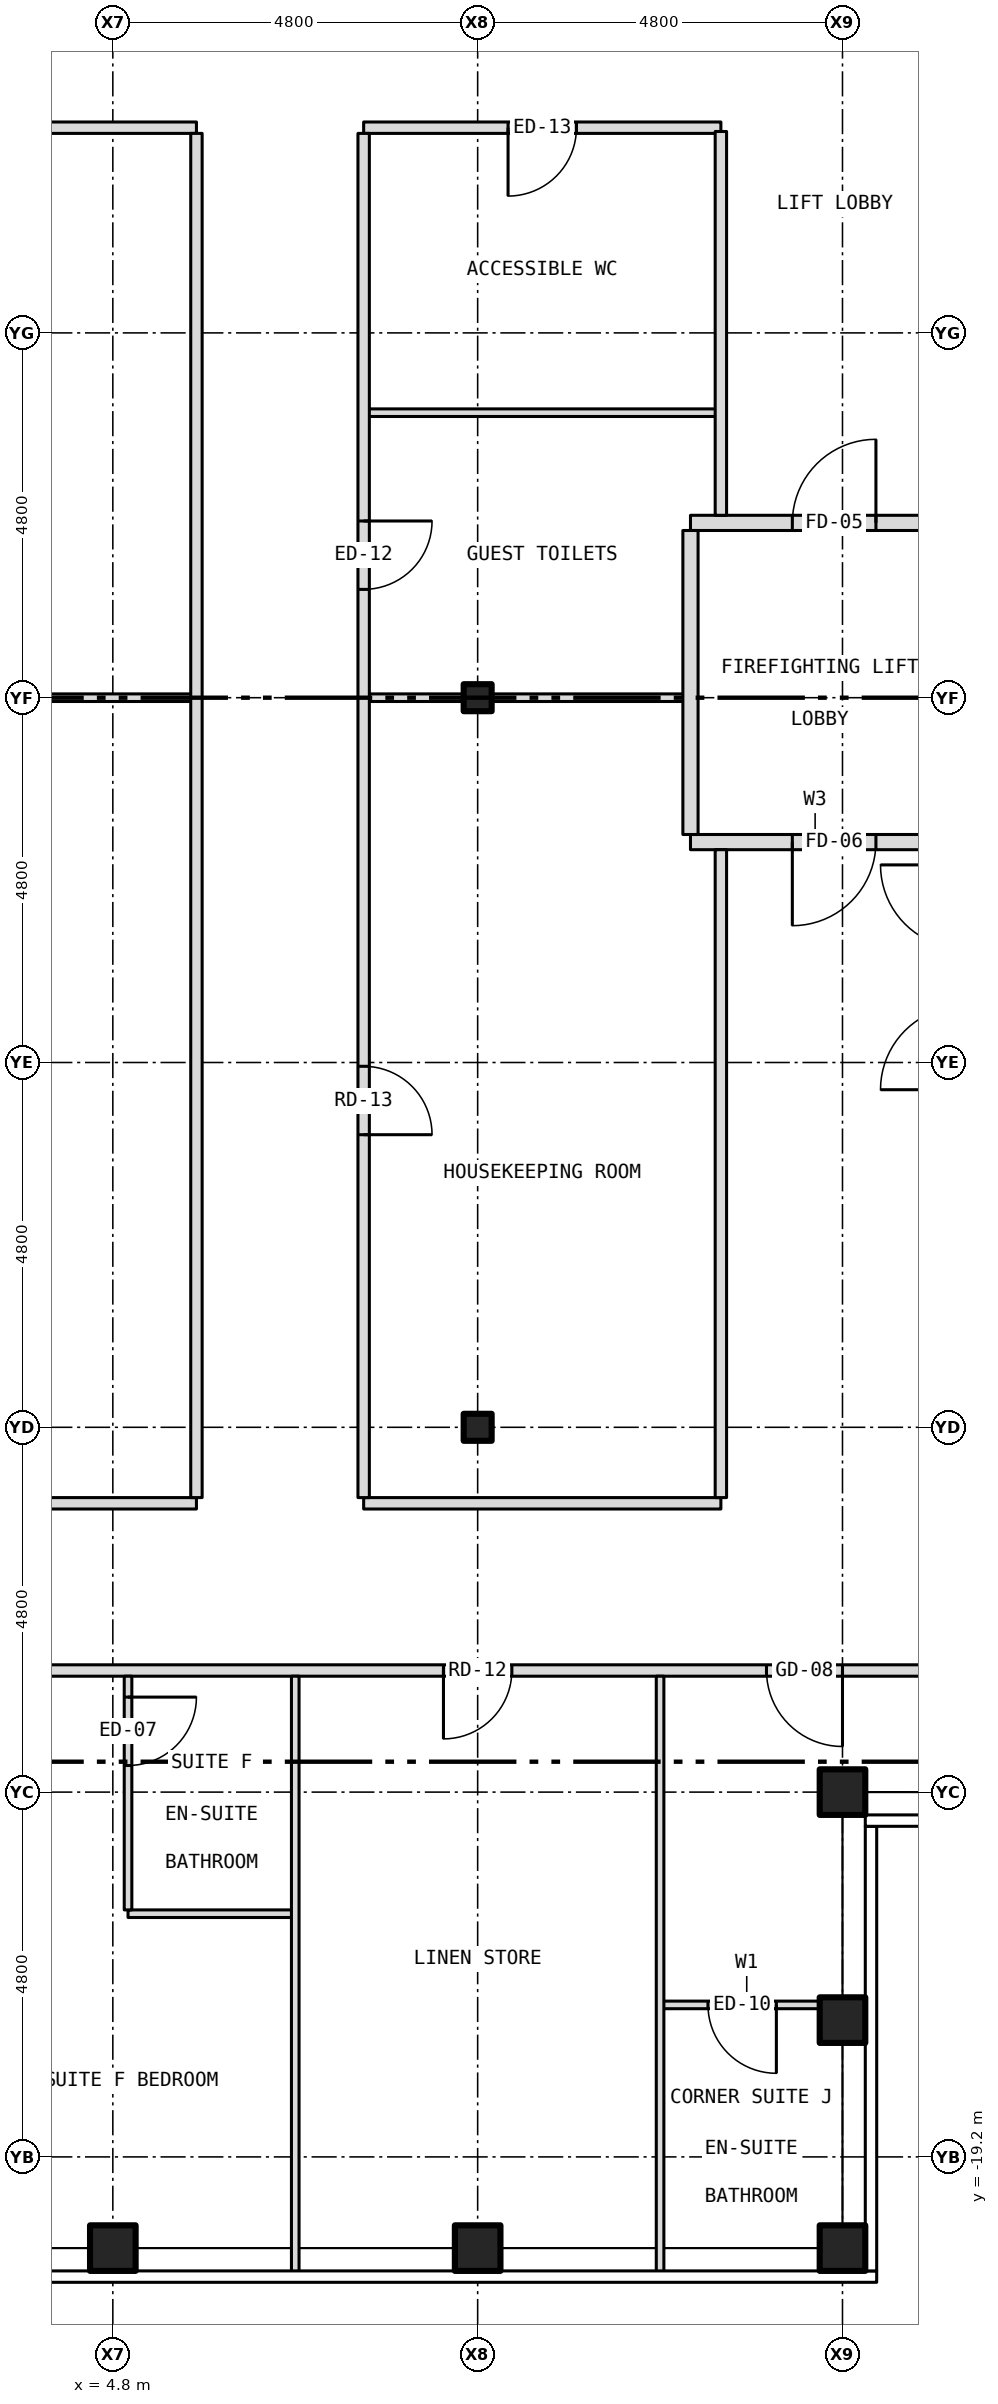
"""IFC4 building model, lengths in metres.
Left out: names, types, materials, properties, quantities, classifications, styles, units other than length and angle.
Written with IfcOpenShell. Run it as: python <this file> out.ifc"""

import sys

from ifc_helpers import new_model, si_unit, direction, frame, frame_2d, origin, origin_2d, place, context, subcontext, project, spatial, rectangle, hollow_rectangle, i_section, extrude, element, fill, save


model = new_model("IFC4")
c1 = context("Model", 3, precision=1e-05, world=origin(), true_north=direction((0.0, 1.0)))
c2 = subcontext(c1, "Body", "Model", "MODEL_VIEW")
j1 = project(units=[si_unit("LENGTHUNIT", "METRE"), si_unit("PLANEANGLEUNIT", "RADIAN")], contexts=[c1])
p1 = place(None, origin())
s1 = spatial("IfcSite", under=j1, at=p1, CompositionType="ELEMENT")
p2 = place(p1, origin())
s2 = spatial("IfcBuilding", under=s1, at=p2, CompositionType="ELEMENT")
p3 = place(p2, frame((0.0, 0.0, 262.0)))
s3 = spatial("IfcBuildingStorey", under=s2, at=p3, CompositionType="ELEMENT", Elevation=262.0)
for number, where, z_axis, x_axis in (
    (1, (4.8, -20.4, -0.15), (0.0, 0.0, 1.0), (1.0, 0.0, 0.0)),
    (2, (9.6, -20.4, -0.15), (0.0, 0.0, 1.0), (1.0, 0.0, 0.0)),
    (3, (14.4, -20.4, -0.15), (0.0, 0.0, 1.0), (1.0, 0.0, 0.0)),
    (4, (14.4, -14.4, -0.15), (0.0, 0.0, 1.0), (1.0, 0.0, 0.0)),
    (5, (14.4, -17.4, -0.15), (0.0, 0.0, 1.0), (1.0, 0.0, 0.0)),
):
    element("IfcColumn", number, at=place(p3, frame(where, z_axis=z_axis, x_axis=x_axis)), inside=s3, PredefinedType="COLUMN", context=c2, shape_type="SweptSolid", body=[
        extrude(hollow_rectangle(XDim=0.6, YDim=0.6, WallThickness=0.03, at=origin_2d()), origin(), (0.0, 0.0, 1.0), 3.4),
    ])
for number, where, z_axis, x_axis in (
    (6, (9.6, -9.6, -0.15), (0.0, 0.0, 1.0), (1.0, 0.0, 0.0)),
    (7, (9.6, 0.0, -0.15), (0.0, 0.0, 1.0), (1.0, 0.0, 0.0)),
):
    element("IfcColumn", number, at=place(p3, frame(where, z_axis=z_axis, x_axis=x_axis)), inside=s3, PredefinedType="COLUMN", context=c2, shape_type="SweptSolid", body=[
        extrude(i_section(OverallWidth=0.368, OverallDepth=0.356, WebThickness=0.011, FlangeThickness=0.018, at=origin_2d()), origin(), (0.0, 0.0, 1.0), 3.4),
    ])
p4 = place(p3, frame((12.0, -17.2, 0.0), z_axis=(0.0, 0.0, 1.0), x_axis=(1.0, 0.0, 0.0)))
e8 = element("IfcWall", 8, at=p4, inside=s3, PredefinedType="PARTITIONING", context=c2, shape_type="SweptSolid", body=[
    extrude(rectangle(XDim=2.28, YDim=0.1, at=frame_2d((1.14, 0.0))), origin(), (0.0, 0.0, 1.0), 3.25),
])
p5 = place(p4, frame((0.63, 0.0, 0.0)))
e9 = element("IfcOpeningElement", 9, at=p5, cuts=e8, PredefinedType="OPENING", context=c2, shape_type="SweptSolid", body=[
    extrude(rectangle(XDim=0.9, YDim=2.1, at=frame_2d((0.45, 1.05))), frame((0.0, 0.062, 0.0), z_axis=(0.0, -1.0, 0.0), x_axis=(1.0, 0.0, 0.0)), (0.0, 0.0, 1.0), 0.124),
])
p6 = place(p3, frame((5.0, -16.0, 0.0), z_axis=(0.0, 0.0, 1.0), x_axis=(1.0, 0.0, 0.0)))
e10 = element("IfcWall", 10, at=p6, inside=s3, PredefinedType="PARTITIONING", context=c2, shape_type="SweptSolid", body=[
    extrude(rectangle(XDim=2.2, YDim=0.1, at=frame_2d((1.1, 0.0))), origin(), (0.0, 0.0, 1.0), 3.25),
])
p7 = place(p3, frame((-15.8, -12.8, 0.0), z_axis=(0.0, 0.0, 1.0), x_axis=(1.0, 0.0, 0.0)))
e11 = element("IfcWall", 11, at=p7, inside=s3, PredefinedType="PARTITIONING", context=c2, shape_type="SweptSolid", body=[
    extrude(rectangle(XDim=31.6, YDim=0.15, at=frame_2d((15.8, 0.0))), origin(), (0.0, 0.0, 1.0), 3.25),
])
p8 = place(p7, frame((6.8, 0.0, 0.0)))
e12 = element("IfcOpeningElement", 12, at=p8, cuts=e11, PredefinedType="OPENING", context=c2, shape_type="SweptSolid", body=[
    extrude(rectangle(XDim=1.0, YDim=2.1, at=frame_2d((0.5, 1.05))), frame((0.0, 0.087, 0.0), z_axis=(0.0, -1.0, 0.0), x_axis=(1.0, 0.0, 0.0)), (0.0, 0.0, 1.0), 0.174),
])
p9 = place(p7, frame((15.35, 0.0, 0.0)))
e13 = element("IfcOpeningElement", 13, at=p9, cuts=e11, PredefinedType="OPENING", context=c2, shape_type="SweptSolid", body=[
    extrude(rectangle(XDim=0.9, YDim=2.1, at=frame_2d((0.45, 1.05))), frame((0.0, 0.087, 0.0), z_axis=(0.0, -1.0, 0.0), x_axis=(1.0, 0.0, 0.0)), (0.0, 0.0, 1.0), 0.174),
])
p10 = place(p7, frame((24.95, 0.0, 0.0)))
e14 = element("IfcOpeningElement", 14, at=p10, cuts=e11, PredefinedType="OPENING", context=c2, shape_type="SweptSolid", body=[
    extrude(rectangle(XDim=0.9, YDim=2.1, at=frame_2d((0.45, 1.05))), frame((0.0, 0.087, 0.0), z_axis=(0.0, -1.0, 0.0), x_axis=(1.0, 0.0, 0.0)), (0.0, 0.0, 1.0), 0.174),
])
p11 = place(p7, frame((1.4, 0.0, 0.0)))
e15 = element("IfcOpeningElement", 15, at=p11, cuts=e11, PredefinedType="OPENING", context=c2, shape_type="SweptSolid", body=[
    extrude(rectangle(XDim=1.0, YDim=2.1, at=frame_2d((0.5, 1.05))), frame((0.0, 0.087, 0.0), z_axis=(0.0, -1.0, 0.0), x_axis=(1.0, 0.0, 0.0)), (0.0, 0.0, 1.0), 0.174),
])
p12 = place(p7, frame((29.2, 0.0, 0.0)))
e16 = element("IfcOpeningElement", 16, at=p12, cuts=e11, PredefinedType="OPENING", context=c2, shape_type="SweptSolid", body=[
    extrude(rectangle(XDim=1.0, YDim=2.1, at=frame_2d((0.5, 1.05))), frame((0.0, 0.087, 0.0), z_axis=(0.0, -1.0, 0.0), x_axis=(1.0, 0.0, 0.0)), (0.0, 0.0, 1.0), 0.174),
])
p13 = place(p3, frame((-12.8, -10.6, 0.0), z_axis=(0.0, 0.0, 1.0), x_axis=(1.0, 0.0, 0.0)))
e17 = element("IfcWall", 17, at=p13, inside=s3, PredefinedType="PARTITIONING", context=c2, shape_type="SweptSolid", body=[
    extrude(rectangle(XDim=18.7, YDim=0.15, at=frame_2d((9.35, 0.0))), origin(), (0.0, 0.0, 1.0), 3.25),
])
p14 = place(p13, frame((8.9, 0.0, 0.0)))
e18 = element("IfcOpeningElement", 18, at=p14, cuts=e17, PredefinedType="OPENING", context=c2, shape_type="SweptSolid", body=[
    extrude(rectangle(XDim=0.9, YDim=2.1, at=frame_2d((0.45, 1.05))), frame((0.0, 0.087, 0.0), z_axis=(0.0, -1.0, 0.0), x_axis=(1.0, 0.0, 0.0)), (0.0, 0.0, 1.0), 0.174),
])
p15 = place(p3, frame((8.1, -10.6, 0.0), z_axis=(0.0, 0.0, 1.0), x_axis=(1.0, 0.0, 0.0)))
e19 = element("IfcWall", 19, at=p15, inside=s3, PredefinedType="PARTITIONING", context=c2, shape_type="SweptSolid", body=[
    extrude(rectangle(XDim=4.7, YDim=0.15, at=frame_2d((2.35, 0.0))), origin(), (0.0, 0.0, 1.0), 3.25),
])
p16 = place(p3, frame((12.4, -1.9, 0.0), z_axis=(0.0, 0.0, 1.0), x_axis=(1.0, 0.0, 0.0)))
e20 = element("IfcWall", 20, at=p16, inside=s3, PredefinedType="PARTITIONING", context=c2, shape_type="SweptSolid", body=[
    extrude(rectangle(XDim=3.28, YDim=0.2, at=frame_2d((1.64, 0.0))), origin(), (0.0, 0.0, 1.0), 3.25),
])
p17 = place(p16, frame((1.34, 0.0, 0.0)))
e21 = element("IfcOpeningElement", 21, at=p17, cuts=e20, PredefinedType="OPENING", context=c2, shape_type="SweptSolid", body=[
    extrude(rectangle(XDim=1.1, YDim=2.1, at=frame_2d((0.55, 1.05))), frame((0.0, 0.112, 0.0), z_axis=(0.0, -1.0, 0.0), x_axis=(1.0, 0.0, 0.0)), (0.0, 0.0, 1.0), 0.224),
])
p18 = place(p3, frame((0.184, 0.0, 0.0), z_axis=(0.0, 0.0, 1.0), x_axis=(1.0, 0.0, 0.0)))
e22 = element("IfcWall", 22, at=p18, inside=s3, PredefinedType="PARTITIONING", context=c2, shape_type="SweptSolid", body=[
    extrude(rectangle(XDim=5.716, YDim=0.1, at=frame_2d((2.858, 0.0))), origin(), (0.0, 0.0, 1.0), 2.16),
])
p19 = place(p3, frame((8.1, 0.0, 0.0), z_axis=(0.0, 0.0, 1.0), x_axis=(1.0, 0.0, 0.0)))
e23 = element("IfcWall", 23, at=p19, inside=s3, PredefinedType="PARTITIONING", context=c2, shape_type="SweptSolid", body=[
    extrude(rectangle(XDim=1.316, YDim=0.1, at=frame_2d((0.658, 0.0))), origin(), (0.0, 0.0, 1.0), 2.16),
])
p20 = place(p3, frame((9.416, 0.0, 0.0), z_axis=(0.0, 0.0, 1.0), x_axis=(1.0, 0.0, 0.0)))
e24 = element("IfcWall", 24, at=p20, inside=s3, PredefinedType="PARTITIONING", context=c2, shape_type="SweptSolid", body=[
    extrude(rectangle(XDim=0.368, YDim=0.1, at=frame_2d((0.184, 0.0))), origin(), (0.0, 0.0, 1.0), 3.25),
])
p21 = place(p3, frame((9.784, 0.0, 0.0), z_axis=(0.0, 0.0, 1.0), x_axis=(1.0, 0.0, 0.0)))
e25 = element("IfcWall", 25, at=p21, inside=s3, PredefinedType="PARTITIONING", context=c2, shape_type="SweptSolid", body=[
    extrude(rectangle(XDim=2.616, YDim=0.1, at=frame_2d((1.308, 0.0))), origin(), (0.0, 0.0, 1.0), 2.16),
])
p22 = place(p3, frame((12.4, 2.3, 0.0), z_axis=(0.0, 0.0, 1.0), x_axis=(1.0, 0.0, 0.0)))
e26 = element("IfcWall", 26, at=p22, inside=s3, PredefinedType="PARTITIONING", context=c2, shape_type="SweptSolid", body=[
    extrude(rectangle(XDim=3.28, YDim=0.2, at=frame_2d((1.64, 0.0))), origin(), (0.0, 0.0, 1.0), 3.25),
])
p23 = place(p22, frame((1.34, 0.0, 0.0)))
e27 = element("IfcOpeningElement", 27, at=p23, cuts=e26, PredefinedType="OPENING", context=c2, shape_type="SweptSolid", body=[
    extrude(rectangle(XDim=1.1, YDim=2.1, at=frame_2d((0.55, 1.05))), frame((0.0, 0.112, 0.0), z_axis=(0.0, -1.0, 0.0), x_axis=(1.0, 0.0, 0.0)), (0.0, 0.0, 1.0), 0.224),
])
p24 = place(p3, frame((8.1, 3.75, 0.0), z_axis=(0.0, 0.0, 1.0), x_axis=(1.0, 0.0, 0.0)))
e28 = element("IfcWall", 28, at=p24, inside=s3, PredefinedType="PARTITIONING", context=c2, shape_type="SweptSolid", body=[
    extrude(rectangle(XDim=4.7, YDim=0.1, at=frame_2d((2.35, 0.0))), origin(), (0.0, 0.0, 1.0), 3.25),
])
p25 = place(p3, frame((-12.8, 7.5, 0.0), z_axis=(0.0, 0.0, 1.0), x_axis=(1.0, 0.0, 0.0)))
e29 = element("IfcWall", 29, at=p25, inside=s3, PredefinedType="PARTITIONING", context=c2, shape_type="SweptSolid", body=[
    extrude(rectangle(XDim=18.7, YDim=0.15, at=frame_2d((9.35, 0.0))), origin(), (0.0, 0.0, 1.0), 3.25),
])
p26 = place(p25, frame((8.9, 0.0, 0.0)))
e30 = element("IfcOpeningElement", 30, at=p26, cuts=e29, PredefinedType="OPENING", context=c2, shape_type="SweptSolid", body=[
    extrude(rectangle(XDim=0.9, YDim=2.1, at=frame_2d((0.45, 1.05))), frame((0.0, 0.087, 0.0), z_axis=(0.0, -1.0, 0.0), x_axis=(1.0, 0.0, 0.0)), (0.0, 0.0, 1.0), 0.174),
])
p27 = place(p3, frame((8.1, 7.5, 0.0), z_axis=(0.0, 0.0, 1.0), x_axis=(1.0, 0.0, 0.0)))
e31 = element("IfcWall", 31, at=p27, inside=s3, PredefinedType="PARTITIONING", context=c2, shape_type="SweptSolid", body=[
    extrude(rectangle(XDim=4.7, YDim=0.15, at=frame_2d((2.35, 0.0))), origin(), (0.0, 0.0, 1.0), 3.25),
])
p28 = place(p27, frame((1.9, 0.0, 0.0)))
e32 = element("IfcOpeningElement", 32, at=p28, cuts=e31, PredefinedType="OPENING", context=c2, shape_type="SweptSolid", body=[
    extrude(rectangle(XDim=0.9, YDim=2.1, at=frame_2d((0.45, 1.05))), frame((0.0, 0.087, 0.0), z_axis=(0.0, -1.0, 0.0), x_axis=(1.0, 0.0, 0.0)), (0.0, 0.0, 1.0), 0.174),
])
p29 = place(p3, frame((5.0, -15.95, 0.0), z_axis=(0.0, 0.0, 1.0), x_axis=(0.0, 1.0, 0.0)))
e33 = element("IfcWall", 33, at=p29, inside=s3, PredefinedType="PARTITIONING", context=c2, shape_type="SweptSolid", body=[
    extrude(rectangle(XDim=3.075, YDim=0.1, at=frame_2d((1.538, 0.0))), origin(), (0.0, 0.0, 1.0), 3.25),
])
p30 = place(p29, frame((1.9, 0.0, 0.0)))
e34 = element("IfcOpeningElement", 34, at=p30, cuts=e33, PredefinedType="OPENING", context=c2, shape_type="SweptSolid", body=[
    extrude(rectangle(XDim=0.9, YDim=2.1, at=frame_2d((0.45, 1.05))), frame((0.0, 0.062, 0.0), z_axis=(0.0, -1.0, 0.0), x_axis=(1.0, 0.0, 0.0)), (0.0, 0.0, 1.0), 0.124),
])
p31 = place(p3, frame((5.9, -10.525, 0.0), z_axis=(0.0, 0.0, 1.0), x_axis=(0.0, 1.0, 0.0)))
e35 = element("IfcWall", 35, at=p31, inside=s3, PredefinedType="PARTITIONING", context=c2, shape_type="SweptSolid", body=[
    extrude(rectangle(XDim=17.95, YDim=0.15, at=frame_2d((8.975, 0.0))), origin(), (0.0, 0.0, 1.0), 3.25),
])
p32 = place(p3, frame((7.2, -20.73, 0.0), z_axis=(0.0, 0.0, 1.0), x_axis=(0.0, 1.0, 0.0)))
e36 = element("IfcWall", 36, at=p32, inside=s3, PredefinedType="PARTITIONING", context=c2, shape_type="SweptSolid", body=[
    extrude(rectangle(XDim=7.855, YDim=0.1, at=frame_2d((3.927, 0.0))), origin(), (0.0, 0.0, 1.0), 3.25),
])
p33 = place(p3, frame((8.1, -10.525, 0.0), z_axis=(0.0, 0.0, 1.0), x_axis=(0.0, 1.0, 0.0)))
e37 = element("IfcWall", 37, at=p33, inside=s3, PredefinedType="PARTITIONING", context=c2, shape_type="SweptSolid", body=[
    extrude(rectangle(XDim=17.95, YDim=0.15, at=frame_2d((8.975, 0.0))), origin(), (0.0, 0.0, 1.0), 3.25),
])
p34 = place(p33, frame((11.95, 0.0, 0.0)))
e38 = element("IfcOpeningElement", 38, at=p34, cuts=e37, PredefinedType="OPENING", context=c2, shape_type="SweptSolid", body=[
    extrude(rectangle(XDim=0.9, YDim=2.1, at=frame_2d((0.45, 1.05))), frame((0.0, 0.087, 0.0), z_axis=(0.0, -1.0, 0.0), x_axis=(1.0, 0.0, 0.0)), (0.0, 0.0, 1.0), 0.174),
])
p35 = place(p33, frame((4.775, 0.0, 0.0)))
e39 = element("IfcOpeningElement", 39, at=p35, cuts=e37, PredefinedType="OPENING", context=c2, shape_type="SweptSolid", body=[
    extrude(rectangle(XDim=0.9, YDim=2.1, at=frame_2d((0.45, 1.05))), frame((0.0, 0.087, 0.0), z_axis=(0.0, -1.0, 0.0), x_axis=(1.0, 0.0, 0.0)), (0.0, 0.0, 1.0), 0.174),
])
p36 = place(p3, frame((12.0, -20.73, 0.0), z_axis=(0.0, 0.0, 1.0), x_axis=(0.0, 1.0, 0.0)))
e40 = element("IfcWall", 40, at=p36, inside=s3, PredefinedType="PARTITIONING", context=c2, shape_type="SweptSolid", body=[
    extrude(rectangle(XDim=7.855, YDim=0.1, at=frame_2d((3.927, 0.0))), origin(), (0.0, 0.0, 1.0), 3.25),
])
p37 = place(p3, frame((12.4, -1.8, 0.0), z_axis=(0.0, 0.0, 1.0), x_axis=(0.0, 1.0, 0.0)))
e41 = element("IfcWall", 41, at=p37, inside=s3, PredefinedType="PARTITIONING", context=c2, shape_type="SweptSolid", body=[
    extrude(rectangle(XDim=4.0, YDim=0.2, at=frame_2d((2.0, 0.0))), origin(), (0.0, 0.0, 1.0), 3.25),
])
p38 = place(p3, frame((12.8, -10.525, 0.0), z_axis=(0.0, 0.0, 1.0), x_axis=(0.0, 1.0, 0.0)))
e42 = element("IfcWall", 42, at=p38, inside=s3, PredefinedType="PARTITIONING", context=c2, shape_type="SweptSolid", body=[
    extrude(rectangle(XDim=8.525, YDim=0.15, at=frame_2d((4.262, 0.0))), origin(), (0.0, 0.0, 1.0), 3.25),
])
p39 = place(p3, frame((12.8, 2.4, 0.0), z_axis=(0.0, 0.0, 1.0), x_axis=(0.0, 1.0, 0.0)))
e43 = element("IfcWall", 43, at=p39, inside=s3, PredefinedType="PARTITIONING", context=c2, shape_type="SweptSolid", body=[
    extrude(rectangle(XDim=5.05, YDim=0.15, at=frame_2d((2.525, 0.0))), origin(), (0.0, 0.0, 1.0), 3.25),
])
p40 = place(p23, origin())
e44 = element("IfcDoor", 44, at=p40, inside=s3, OperationType="SINGLE_SWING_RIGHT", PredefinedType="DOOR", context=c2, shape_type="SweptSolid", body=[
    extrude(rectangle(XDim=1.1, YDim=2.1, at=frame_2d((0.55, 1.05))), frame((0.0, 0.025, 0.0), z_axis=(0.0, -1.0, 0.0), x_axis=(1.0, 0.0, 0.0)), (0.0, 0.0, 1.0), 0.05),
])
fill(e27, e44)
p41 = place(p17, origin())
e45 = element("IfcDoor", 45, at=p41, inside=s3, OperationType="SINGLE_SWING_LEFT", PredefinedType="DOOR", context=c2, shape_type="SweptSolid", body=[
    extrude(rectangle(XDim=1.1, YDim=2.1, at=frame_2d((0.55, 1.05))), frame((0.0, 0.025, 0.0), z_axis=(0.0, -1.0, 0.0), x_axis=(1.0, 0.0, 0.0)), (0.0, 0.0, 1.0), 0.05),
])
fill(e21, e45)
p42 = place(p30, origin())
e46 = element("IfcDoor", 46, at=p42, inside=s3, OperationType="SINGLE_SWING_RIGHT", PredefinedType="DOOR", context=c2, shape_type="SweptSolid", body=[
    extrude(rectangle(XDim=0.9, YDim=2.1, at=frame_2d((0.45, 1.05))), frame((0.0, 0.025, 0.0), z_axis=(0.0, -1.0, 0.0), x_axis=(1.0, 0.0, 0.0)), (0.0, 0.0, 1.0), 0.05),
])
fill(e34, e46)
p43 = place(p10, origin())
e47 = element("IfcDoor", 47, at=p43, inside=s3, OperationType="SINGLE_SWING_LEFT", PredefinedType="DOOR", context=c2, shape_type="SweptSolid", body=[
    extrude(rectangle(XDim=0.9, YDim=2.1, at=frame_2d((0.45, 1.05))), frame((0.0, 0.025, 0.0), z_axis=(0.0, -1.0, 0.0), x_axis=(1.0, 0.0, 0.0)), (0.0, 0.0, 1.0), 0.05),
])
fill(e14, e47)
p44 = place(p5, origin())
e48 = element("IfcDoor", 48, at=p44, inside=s3, OperationType="SINGLE_SWING_RIGHT", PredefinedType="DOOR", context=c2, shape_type="SweptSolid", body=[
    extrude(rectangle(XDim=0.9, YDim=2.1, at=frame_2d((0.45, 1.05))), frame((0.0, 0.025, 0.0), z_axis=(0.0, -1.0, 0.0), x_axis=(1.0, 0.0, 0.0)), (0.0, 0.0, 1.0), 0.05),
])
fill(e9, e48)
p45 = place(p12, origin())
e49 = element("IfcDoor", 49, at=p45, inside=s3, OperationType="SINGLE_SWING_RIGHT", PredefinedType="DOOR", context=c2, shape_type="SweptSolid", body=[
    extrude(rectangle(XDim=1.0, YDim=2.1, at=frame_2d((0.5, 1.05))), frame((0.0, 0.025, 0.0), z_axis=(0.0, -1.0, 0.0), x_axis=(1.0, 0.0, 0.0)), (0.0, 0.0, 1.0), 0.05),
])
fill(e16, e49)
p46 = place(p34, origin())
e50 = element("IfcDoor", 50, at=p46, inside=s3, OperationType="SINGLE_SWING_RIGHT", PredefinedType="DOOR", context=c2, shape_type="SweptSolid", body=[
    extrude(rectangle(XDim=0.9, YDim=2.1, at=frame_2d((0.45, 1.05))), frame((0.0, 0.025, 0.0), z_axis=(0.0, -1.0, 0.0), x_axis=(1.0, 0.0, 0.0)), (0.0, 0.0, 1.0), 0.05),
])
fill(e38, e50)
p47 = place(p28, origin())
e51 = element("IfcDoor", 51, at=p47, inside=s3, OperationType="SINGLE_SWING_LEFT", PredefinedType="DOOR", context=c2, shape_type="SweptSolid", body=[
    extrude(rectangle(XDim=0.9, YDim=2.1, at=frame_2d((0.45, 1.05))), frame((0.0, 0.025, 0.0), z_axis=(0.0, -1.0, 0.0), x_axis=(1.0, 0.0, 0.0)), (0.0, 0.0, 1.0), 0.05),
])
fill(e32, e51)
p48 = place(p35, origin())
e52 = element("IfcDoor", 52, at=p48, inside=s3, OperationType="SINGLE_SWING_LEFT", PredefinedType="DOOR", context=c2, shape_type="SweptSolid", body=[
    extrude(rectangle(XDim=0.9, YDim=2.1, at=frame_2d((0.45, 1.05))), frame((0.0, 0.025, 0.0), z_axis=(0.0, -1.0, 0.0), x_axis=(1.0, 0.0, 0.0)), (0.0, 0.0, 1.0), 0.05),
])
fill(e39, e52)
save(model, sys.argv[1])
